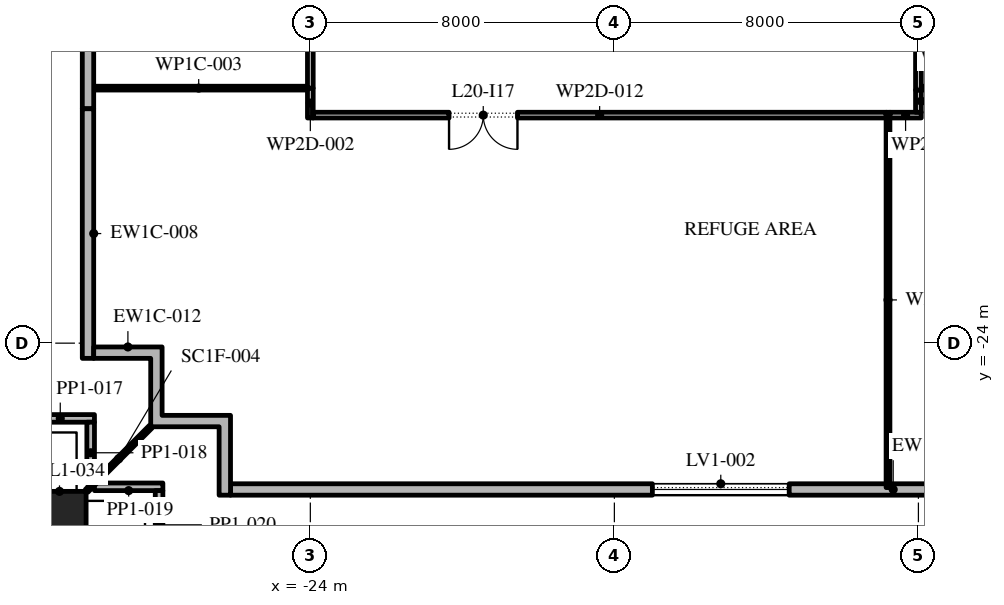
"""IFC4 building model, lengths in metres.
Left out: names, types, materials, properties, quantities, classifications, styles, units other than length and angle.
Written with IfcOpenShell. Run it as: python <this file> out.ifc"""

import sys

from ifc_helpers import new_model, si_unit, direction, frame, frame_2d, origin, origin_2d, place, context, subcontext, project, spatial, polyline, rectangle, outline, extrude, element, fill, save


model = new_model("IFC4")
c1 = context("Model", 3, precision=1e-05, world=origin(), true_north=direction((0.0, 1.0)))
c2 = subcontext(c1, "Body", "Model", "MODEL_VIEW")
j1 = project(units=[si_unit("LENGTHUNIT", "METRE"), si_unit("PLANEANGLEUNIT", "RADIAN")], contexts=[c1])
p1 = place(None, origin())
s1 = spatial("IfcSite", under=j1, at=p1, CompositionType="ELEMENT")
p2 = place(p1, origin())
s2 = spatial("IfcBuilding", under=s1, at=p2, CompositionType="ELEMENT")
p3 = place(p2, frame((0.0, 0.0, 94.2)))
s3 = spatial("IfcBuildingStorey", under=s2, at=p3, CompositionType="ELEMENT", Elevation=94.2)
p4 = place(p3, frame((-30.6, -28.6, 0.0), z_axis=(0.0, 0.0, 1.0), x_axis=(1.0, 0.0, 0.0)))
e1 = element("IfcColumn", 1, at=p4, inside=s3, PredefinedType="COLUMN", context=c2, shape_type="SweptSolid", body=[
    extrude(rectangle(XDim=1.4, YDim=1.4, at=origin_2d()), origin(), (0.0, 0.0, 1.0), 5.4),
])
p5 = place(p3, frame((-26.1, -27.85, 0.0), z_axis=(0.0, 0.0, 1.0), x_axis=(1.0, 0.0, 0.0)))
e2 = element("IfcWall", 2, at=p5, inside=s3, PredefinedType="STANDARD", context=c2, shape_type="SweptSolid", body=[
    extrude(rectangle(XDim=34.873, YDim=0.3, at=frame_2d((17.437, 0.0))), origin(), (0.0, 0.0, 1.0), 4.95),
])
p6 = place(p5, frame((11.1, 0.0, 0.6)))
e3 = element("IfcOpeningElement", 3, at=p6, cuts=e2, PredefinedType="OPENING", context=c2, shape_type="SweptSolid", body=[
    extrude(rectangle(XDim=3.6, YDim=3.9, at=frame_2d((1.8, 1.95))), frame((0.0, 0.16, 0.0), z_axis=(0.0, -1.0, 0.0), x_axis=(1.0, 0.0, 0.0)), (0.0, 0.0, 1.0), 0.32),
])
p7 = place(p5, frame((19.9, 0.0, 0.6)))
e4 = element("IfcOpeningElement", 4, at=p7, cuts=e2, PredefinedType="OPENING", context=c2, shape_type="SweptSolid", body=[
    extrude(rectangle(XDim=3.6, YDim=3.9, at=frame_2d((1.8, 1.95))), frame((0.0, 0.16, 0.0), z_axis=(0.0, -1.0, 0.0), x_axis=(1.0, 0.0, 0.0)), (0.0, 0.0, 1.0), 0.32),
])
p8 = place(p3, origin())
e5 = element("IfcWall", 5, at=p8, inside=s3, PredefinedType="STANDARD", context=c2, shape_type="SweptSolid", body=[
    extrude(outline(polyline([(-26.4, -26.2), (-28.2, -26.2), (-28.2, -24.4), (-29.7, -24.4), (-29.7, -24.1), (-27.9, -24.1), (-27.9, -25.9), (-26.1, -25.9), (-26.1, -28.0), (-26.4, -28.0), (-26.4, -26.2)])), origin(), (0.0, 0.0, 1.0), 4.95),
])
p9 = place(p3, frame((-31.48, -25.98, -0.05), z_axis=(0.0, 0.0, 1.0), x_axis=(1.0, 0.0, 0.0)))
e6 = element("IfcWall", 6, at=p9, inside=s3, PredefinedType="STANDARD", context=c2, shape_type="SweptSolid", body=[
    extrude(rectangle(XDim=1.8, YDim=0.2, at=frame_2d((0.9, 0.0))), origin(), (0.0, 0.0, 1.0), 1.1),
])
p10 = place(p3, frame((-29.78, -26.08, -0.05), z_axis=(0.0, 0.0, 1.0), x_axis=(0.0, -1.0, 0.0)))
e7 = element("IfcWall", 7, at=p10, inside=s3, PredefinedType="STANDARD", context=c2, shape_type="SweptSolid", body=[
    extrude(rectangle(XDim=1.608, YDim=0.2, at=frame_2d((0.804, 0.0))), origin(), (0.0, 0.0, 1.0), 1.1),
])
for number, where, z_axis, x_axis in (
    (8, (-29.68, -27.78, -0.05), (0.0, 0.0, 1.0), (1.0, 0.0, 0.0)),
    (9, (-27.98, -27.88, -0.05), (0.0, 0.0, 1.0), (0.0, -1.0, 0.0)),
):
    element("IfcWall", number, at=place(p3, frame(where, z_axis=z_axis, x_axis=x_axis)), inside=s3, PredefinedType="STANDARD", context=c2, shape_type="SweptSolid", body=[
        extrude(rectangle(XDim=1.8, YDim=0.2, at=frame_2d((0.9, 0.0))), origin(), (0.0, 0.0, 1.0), 1.1),
    ])
p11 = place(p3, frame((-28.2, -26.2, -0.05), z_axis=(0.0, 0.0, 1.0), x_axis=(-0.707106781187, -0.707106781187, 0.0)))
e10 = element("IfcWall", 10, at=p11, inside=s3, PredefinedType="STANDARD", context=c2, shape_type="SweptSolid", body=[
    extrude(rectangle(XDim=2.385, YDim=0.1, at=frame_2d((1.192, 0.0))), origin(), (0.0, 0.0, 1.0), 5.0),
])
p12 = place(p3, frame((-24.0, -18.075, 0.0), z_axis=(0.0, 0.0, 1.0), x_axis=(0.0, 1.0, 0.0)))
e11 = element("IfcWall", 11, at=p12, inside=s3, PredefinedType="PARTITIONING", context=c2, shape_type="SweptSolid", body=[
    extrude(rectangle(XDim=0.785, YDim=0.15, at=frame_2d((0.393, 0.0))), origin(), (0.0, 0.0, 1.0), 4.95),
])
p13 = place(p3, frame((-24.075, -17.29, 0.0), z_axis=(0.0, 0.0, 1.0), x_axis=(-1.0, 0.0, 0.0)))
e12 = element("IfcWall", 12, at=p13, inside=s3, PredefinedType="PARTITIONING", context=c2, shape_type="SweptSolid", body=[
    extrude(rectangle(XDim=5.725, YDim=0.1, at=frame_2d((2.863, 0.0))), origin(), (0.0, 0.0, 1.0), 4.95),
])
p14 = place(p3, frame((-24.0, -17.29, 0.0), z_axis=(0.0, 0.0, 1.0), x_axis=(0.0, 1.0, 0.0)))
e13 = element("IfcWall", 13, at=p14, inside=s3, PredefinedType="PARTITIONING", context=c2, shape_type="SweptSolid", body=[
    extrude(rectangle(XDim=7.17, YDim=0.15, at=frame_2d((3.585, 0.0))), origin(), (0.0, 0.0, 1.0), 4.95),
])
p15 = place(p14, frame((4.47, 0.0, 0.0)))
e14 = element("IfcOpeningElement", 14, at=p15, cuts=e13, PredefinedType="OPENING", context=c2, shape_type="SweptSolid", body=[
    extrude(rectangle(XDim=1.0, YDim=2.1, at=frame_2d((0.5, 1.05))), frame((0.0, 0.085, 0.0), z_axis=(0.0, -1.0, 0.0), x_axis=(1.0, 0.0, 0.0)), (0.0, 0.0, 1.0), 0.17),
])
p16 = place(p3, frame((-8.8, -27.8, 0.0), z_axis=(0.0, 0.0, 1.0), x_axis=(0.0, 1.0, 0.0)))
e15 = element("IfcWall", 15, at=p16, inside=s3, PredefinedType="PARTITIONING", context=c2, shape_type="SweptSolid", body=[
    extrude(rectangle(XDim=9.875, YDim=0.1, at=frame_2d((4.938, 0.0))), origin(), (0.0, 0.0, 1.0), 4.95),
])
p17 = place(p3, frame((-8.85, -18.0, 0.0), z_axis=(0.0, 0.0, 1.0), x_axis=(-1.0, 0.0, 0.0)))
e16 = element("IfcWall", 16, at=p17, inside=s3, PredefinedType="PARTITIONING", context=c2, shape_type="SweptSolid", body=[
    extrude(rectangle(XDim=15.075, YDim=0.15, at=frame_2d((7.538, 0.0))), origin(), (0.0, 0.0, 1.0), 4.95),
])
p18 = place(p17, frame((9.7, 0.0, 0.0)))
e17 = element("IfcOpeningElement", 17, at=p18, cuts=e16, PredefinedType="OPENING", context=c2, shape_type="SweptSolid", body=[
    extrude(rectangle(XDim=1.8, YDim=2.1, at=frame_2d((0.9, 1.05))), frame((0.0, 0.085, 0.0), z_axis=(0.0, -1.0, 0.0), x_axis=(1.0, 0.0, 0.0)), (0.0, 0.0, 1.0), 0.17),
])
p19 = place(p3, frame((-7.925, -18.0, 0.0), z_axis=(0.0, 0.0, 1.0), x_axis=(-1.0, 0.0, 0.0)))
e18 = element("IfcWall", 18, at=p19, inside=s3, PredefinedType="PARTITIONING", context=c2, shape_type="SweptSolid", body=[
    extrude(rectangle(XDim=0.825, YDim=0.15, at=frame_2d((0.413, 0.0))), origin(), (0.0, 0.0, 1.0), 4.95),
])
p20 = place(p3, frame((-8.0, -17.34, 0.0), z_axis=(0.0, 0.0, 1.0), x_axis=(0.0, -1.0, 0.0)))
e19 = element("IfcWall", 19, at=p20, inside=s3, PredefinedType="PARTITIONING", context=c2, shape_type="SweptSolid", body=[
    extrude(rectangle(XDim=0.585, YDim=0.15, at=frame_2d((0.292, 0.0))), origin(), (0.0, 0.0, 1.0), 4.95),
])
p21 = place(p3, frame((-8.0, -10.12, 0.0), z_axis=(0.0, 0.0, 1.0), x_axis=(0.0, -1.0, 0.0)))
e20 = element("IfcWall", 20, at=p21, inside=s3, PredefinedType="PARTITIONING", context=c2, shape_type="SweptSolid", body=[
    extrude(rectangle(XDim=7.22, YDim=0.15, at=frame_2d((3.61, 0.0))), origin(), (0.0, 0.0, 1.0), 4.95),
])
p22 = place(p21, frame((1.77, 0.0, 0.0)))
e21 = element("IfcOpeningElement", 21, at=p22, cuts=e20, PredefinedType="OPENING", context=c2, shape_type="SweptSolid", body=[
    extrude(rectangle(XDim=1.0, YDim=2.1, at=frame_2d((0.5, 1.05))), frame((0.0, 0.085, 0.0), z_axis=(0.0, -1.0, 0.0), x_axis=(1.0, 0.0, 0.0)), (0.0, 0.0, 1.0), 0.17),
])
p23 = place(p3, frame((-0.05, -17.29, 0.0), z_axis=(0.0, 0.0, 1.0), x_axis=(-1.0, 0.0, 0.0)))
e22 = element("IfcWall", 22, at=p23, inside=s3, PredefinedType="PARTITIONING", context=c2, shape_type="SweptSolid", body=[
    extrude(rectangle(XDim=7.875, YDim=0.1, at=frame_2d((3.938, 0.0))), origin(), (0.0, 0.0, 1.0), 4.95),
])
p24 = place(p3, frame((-29.85, -2.729, 0.0), z_axis=(0.0, 0.0, 1.0), x_axis=(0.0, -1.0, 0.0)))
e23 = element("IfcWall", 23, at=p24, inside=s3, PredefinedType="STANDARD", context=c2, shape_type="SweptSolid", body=[
    extrude(rectangle(XDim=15.104, YDim=0.3, at=frame_2d((7.552, 0.0))), origin(), (0.0, 0.0, 1.0), 4.196),
])
p25 = place(p24, frame((2.086, 0.0, 0.6)))
e24 = element("IfcOpeningElement", 24, at=p25, cuts=e23, PredefinedType="OPENING", context=c2, shape_type="SweptSolid", body=[
    extrude(rectangle(XDim=3.6, YDim=3.475, at=frame_2d((1.8, 1.738))), frame((0.0, 0.16, 0.0), z_axis=(0.0, -1.0, 0.0), x_axis=(1.0, 0.0, 0.0)), (0.0, 0.0, 1.0), 0.32),
])
p26 = place(p24, frame((9.2, 0.0, 0.6)))
e25 = element("IfcOpeningElement", 25, at=p26, cuts=e23, PredefinedType="OPENING", context=c2, shape_type="SweptSolid", body=[
    extrude(rectangle(XDim=3.6, YDim=3.475, at=frame_2d((1.8, 1.738))), frame((0.0, 0.16, 0.0), z_axis=(0.0, -1.0, 0.0), x_axis=(1.0, 0.0, 0.0)), (0.0, 0.0, 1.0), 0.32),
])
p27 = place(p3, frame((-29.85, -17.833, 0.0), z_axis=(0.0, 0.0, 1.0), x_axis=(0.0, -1.0, 0.0)))
e26 = element("IfcWall", 26, at=p27, inside=s3, PredefinedType="STANDARD", context=c2, shape_type="SweptSolid", body=[
    extrude(rectangle(XDim=6.567, YDim=0.3, at=frame_2d((3.284, 0.0))), origin(), (0.0, 0.0, 1.0), 4.95),
])
p28 = place(p6, origin())
e27 = element("IfcWindow", 27, at=p28, inside=s3, PartitioningType="DOUBLE_PANEL_HORIZONTAL", PredefinedType="WINDOW", context=c2, shape_type="SweptSolid", body=[
    extrude(rectangle(XDim=3.6, YDim=3.9, at=frame_2d((1.8, 1.95))), frame((0.0, 0.03, 0.0), z_axis=(0.0, -1.0, 0.0), x_axis=(1.0, 0.0, 0.0)), (0.0, 0.0, 1.0), 0.06),
])
fill(e3, e27)
p29 = place(p18, origin())
e28 = element("IfcDoor", 28, at=p29, inside=s3, OperationType="SINGLE_SWING_RIGHT", PredefinedType="DOOR", context=c2, shape_type="SweptSolid", body=[
    extrude(rectangle(XDim=1.8, YDim=2.1, at=frame_2d((0.9, 1.05))), frame((0.0, 0.025, 0.0), z_axis=(0.0, -1.0, 0.0), x_axis=(1.0, 0.0, 0.0)), (0.0, 0.0, 1.0), 0.05),
])
fill(e17, e28)
save(model, sys.argv[1])
